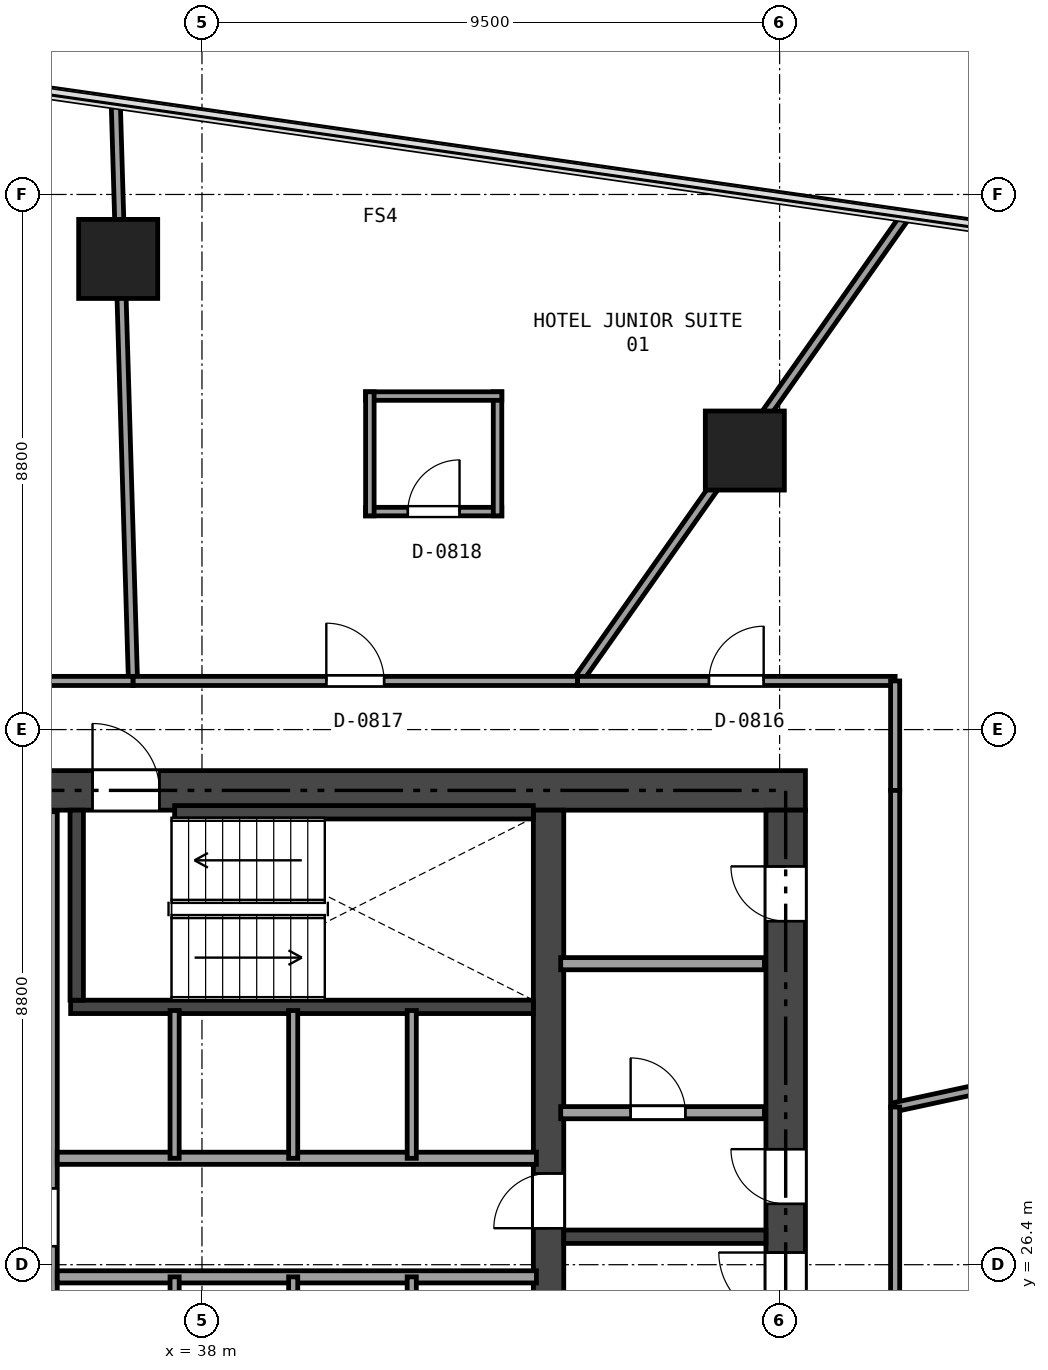
"""IFC4 building model, lengths in metres.
Left out: names, types, materials, properties, quantities, classifications, styles, units other than length and angle.
Written with IfcOpenShell. Run it as: python <this file> out.ifc"""

import sys

from ifc_helpers import new_model, si_unit, direction, frame, frame_2d, origin, origin_2d, place, context, subcontext, project, spatial, rectangle, extrude, element, fill, save


model = new_model("IFC4")
c1 = context("Model", 3, precision=1e-05, world=origin(), true_north=direction((0.0, 1.0)))
c2 = subcontext(c1, "Body", "Model", "MODEL_VIEW")
j1 = project(units=[si_unit("LENGTHUNIT", "METRE"), si_unit("PLANEANGLEUNIT", "RADIAN")], contexts=[c1])
p1 = place(None, origin())
s1 = spatial("IfcSite", under=j1, at=p1, CompositionType="ELEMENT")
p2 = place(p1, origin())
s2 = spatial("IfcBuilding", under=s1, at=p2, CompositionType="ELEMENT")
p3 = place(p2, frame((0.0, 0.0, 37.35)))
s3 = spatial("IfcBuildingStorey", under=s2, at=p3, CompositionType="ELEMENT", Elevation=37.35)
p4 = place(p3, frame((26.475, 34.2, 0.0), z_axis=(0.0, 0.0, 1.0), x_axis=(1.0, 0.0, 0.0)))
e1 = element("IfcWall", 1, at=p4, inside=s3, PredefinedType="SHEAR", context=c2, shape_type="SweptSolid", body=[
    extrude(rectangle(XDim=21.45, YDim=0.65, at=frame_2d((10.725, 0.0))), origin(), (0.0, 0.0, 1.0), 3.17),
])
p5 = place(p4, frame((9.725, 0.0, 0.0)))
e2 = element("IfcOpeningElement", 2, at=p5, cuts=e1, PredefinedType="OPENING", context=c2, shape_type="SweptSolid", body=[
    extrude(rectangle(XDim=1.1, YDim=2.15, at=frame_2d((0.55, 1.075))), frame((0.0, 0.335, 0.0), z_axis=(0.0, -1.0, 0.0), x_axis=(1.0, 0.0, 0.0)), (0.0, 0.0, 1.0), 0.67),
])
p6 = place(p4, frame((1.975, 0.0, 0.0)))
e3 = element("IfcOpeningElement", 3, at=p6, cuts=e1, PredefinedType="OPENING", context=c2, shape_type="SweptSolid", body=[
    extrude(rectangle(XDim=0.9, YDim=2.1, at=frame_2d((0.45, 1.05))), frame((0.0, 0.335, 0.0), z_axis=(0.0, -1.0, 0.0), x_axis=(1.0, 0.0, 0.0)), (0.0, 0.0, 1.0), 0.67),
])
p7 = place(p4, frame((6.275, 0.0, 0.0)))
e4 = element("IfcOpeningElement", 4, at=p7, cuts=e1, PredefinedType="OPENING", context=c2, shape_type="SweptSolid", body=[
    extrude(rectangle(XDim=0.9, YDim=2.1, at=frame_2d((0.45, 1.05))), frame((0.0, 0.335, 0.0), z_axis=(0.0, -1.0, 0.0), x_axis=(1.0, 0.0, 0.0)), (0.0, 0.0, 1.0), 0.67),
])
p8 = place(p3, frame((47.6, 18.925, 0.0), z_axis=(0.0, 0.0, 1.0), x_axis=(0.0, 1.0, 0.0)))
e5 = element("IfcWall", 5, at=p8, inside=s3, PredefinedType="SHEAR", context=c2, shape_type="SweptSolid", body=[
    extrude(rectangle(XDim=14.95, YDim=0.65, at=frame_2d((7.475, 0.0))), origin(), (0.0, 0.0, 1.0), 3.17),
])
p9 = place(p8, frame((6.575, 0.0, 0.0)))
e6 = element("IfcOpeningElement", 6, at=p9, cuts=e5, PredefinedType="OPENING", context=c2, shape_type="SweptSolid", body=[
    extrude(rectangle(XDim=1.1, YDim=2.15, at=frame_2d((0.55, 1.075))), frame((0.0, 0.335, 0.0), z_axis=(0.0, -1.0, 0.0), x_axis=(1.0, 0.0, 0.0)), (0.0, 0.0, 1.0), 0.67),
])
p10 = place(p8, frame((8.475, 0.0, 0.0)))
e7 = element("IfcOpeningElement", 7, at=p10, cuts=e5, PredefinedType="OPENING", context=c2, shape_type="SweptSolid", body=[
    extrude(rectangle(XDim=0.9, YDim=2.1, at=frame_2d((0.45, 1.05))), frame((0.0, 0.335, 0.0), z_axis=(0.0, -1.0, 0.0), x_axis=(1.0, 0.0, 0.0)), (0.0, 0.0, 1.0), 0.67),
])
p11 = place(p8, frame((13.125, 0.0, 0.0)))
e8 = element("IfcOpeningElement", 8, at=p11, cuts=e5, PredefinedType="OPENING", context=c2, shape_type="SweptSolid", body=[
    extrude(rectangle(XDim=0.9, YDim=2.1, at=frame_2d((0.45, 1.05))), frame((0.0, 0.335, 0.0), z_axis=(0.0, -1.0, 0.0), x_axis=(1.0, 0.0, 0.0)), (0.0, 0.0, 1.0), 0.67),
])
p12 = place(p3, frame((43.7, 18.925, 0.0), z_axis=(0.0, 0.0, 1.0), x_axis=(0.0, 1.0, 0.0)))
e9 = element("IfcWall", 9, at=p12, inside=s3, PredefinedType="SHEAR", context=c2, shape_type="SweptSolid", body=[
    extrude(rectangle(XDim=14.95, YDim=0.5, at=frame_2d((7.475, 0.0))), origin(), (0.0, 0.0, 1.0), 3.17),
])
p13 = place(p12, frame((8.075, 0.0, 0.0)))
e10 = element("IfcOpeningElement", 10, at=p13, cuts=e9, PredefinedType="OPENING", context=c2, shape_type="SweptSolid", body=[
    extrude(rectangle(XDim=0.9, YDim=2.1, at=frame_2d((0.45, 1.05))), frame((0.0, 0.26, 0.0), z_axis=(0.0, -1.0, 0.0), x_axis=(1.0, 0.0, 0.0)), (0.0, 0.0, 1.0), 0.52),
])
p14 = place(p3, frame((43.95, 26.86, 0.0), z_axis=(0.0, 0.0, 1.0), x_axis=(1.0, 0.0, 0.0)))
e11 = element("IfcWall", 11, at=p14, inside=s3, PredefinedType="SHEAR", context=c2, shape_type="SweptSolid", body=[
    extrude(rectangle(XDim=3.325, YDim=0.22, at=frame_2d((1.663, 0.0))), origin(), (0.0, 0.0, 1.0), 3.17),
])
p15 = place(p3, frame((35.84, 30.64, 0.0), z_axis=(0.0, 0.0, 1.0), x_axis=(1.0, 0.0, 0.0)))
e12 = element("IfcWall", 12, at=p15, inside=s3, PredefinedType="SHEAR", context=c2, shape_type="SweptSolid", body=[
    extrude(rectangle(XDim=7.61, YDim=0.22, at=frame_2d((3.805, 0.0))), origin(), (0.0, 0.0, 1.0), 3.17),
])
p16 = place(p3, frame((35.94, 30.75, 0.0), z_axis=(0.0, 0.0, 1.0), x_axis=(0.0, 1.0, 0.0)))
e13 = element("IfcWall", 13, at=p16, inside=s3, PredefinedType="SHEAR", context=c2, shape_type="SweptSolid", body=[
    extrude(rectangle(XDim=3.125, YDim=0.22, at=frame_2d((1.562, 0.0))), origin(), (0.0, 0.0, 1.0), 3.17),
])
p17 = place(p3, frame((37.55, 33.84, 0.0), z_axis=(0.0, 0.0, 1.0), x_axis=(1.0, 0.0, 0.0)))
e14 = element("IfcWall", 14, at=p17, inside=s3, PredefinedType="SHEAR", context=c2, shape_type="SweptSolid", body=[
    extrude(rectangle(XDim=5.9, YDim=0.22, at=frame_2d((2.95, 0.0))), origin(), (0.0, 0.0, 1.0), 3.17),
])
for number, where, z_axis, x_axis in (
    (15, (46.928, 39.789, 0.0), (0.0, 0.0, 1.0), (1.0, 0.0, 0.0)),
    (16, (36.622, 42.94, 0.0), (0.0, 0.0, 1.0), (1.0, 0.0, 0.0)),
):
    element("IfcColumn", number, at=place(p3, frame(where, z_axis=z_axis, x_axis=x_axis)), inside=s3, PredefinedType="COLUMN", context=c2, shape_type="SweptSolid", body=[
        extrude(rectangle(XDim=1.3, YDim=1.3, at=origin_2d()), origin(), (0.0, 0.0, 1.0), 3.17),
    ])
p18 = place(p3, frame((43.9, 28.9, 0.0), z_axis=(0.0, 0.0, 1.0), x_axis=(1.0, 0.0, 0.0)))
e17 = element("IfcWall", 17, at=p18, inside=s3, PredefinedType="SOLIDWALL", context=c2, shape_type="SweptSolid", body=[
    extrude(rectangle(XDim=3.35, YDim=0.2, at=frame_2d((1.675, 0.0))), origin(), (0.0, 0.0, 1.0), 3.17),
])
p19 = place(p18, frame((1.15, 0.0, 0.0)))
e18 = element("IfcOpeningElement", 18, at=p19, cuts=e17, PredefinedType="OPENING", context=c2, shape_type="SweptSolid", body=[
    extrude(rectangle(XDim=0.9, YDim=2.1, at=frame_2d((0.45, 1.05))), frame((0.0, 0.11, 0.0), z_axis=(0.0, -1.0, 0.0), x_axis=(1.0, 0.0, 0.0)), (0.0, 0.0, 1.0), 0.22),
])
p20 = place(p3, frame((43.9, 31.35, 0.0), z_axis=(0.0, 0.0, 1.0), x_axis=(1.0, 0.0, 0.0)))
e19 = element("IfcWall", 19, at=p20, inside=s3, PredefinedType="SOLIDWALL", context=c2, shape_type="SweptSolid", body=[
    extrude(rectangle(XDim=3.35, YDim=0.2, at=frame_2d((1.675, 0.0))), origin(), (0.0, 0.0, 1.0), 3.17),
])
p21 = place(p3, frame((35.52, 18.95, 0.0), z_axis=(0.0, 0.0, 1.0), x_axis=(0.0, 1.0, 0.0)))
e20 = element("IfcWall", 20, at=p21, inside=s3, PredefinedType="SOLIDWALL", context=c2, shape_type="SweptSolid", body=[
    extrude(rectangle(XDim=14.9, YDim=0.2, at=frame_2d((7.45, 0.0))), origin(), (0.0, 0.0, 1.0), 2.691),
])
p22 = place(p21, frame((7.755, 0.0, 0.0)))
e21 = element("IfcOpeningElement", 21, at=p22, cuts=e20, PredefinedType="OPENING", context=c2, shape_type="SweptSolid", body=[
    extrude(rectangle(XDim=0.95, YDim=2.15, at=frame_2d((0.475, 1.075))), frame((0.0, 0.11, 0.0), z_axis=(0.0, -1.0, 0.0), x_axis=(1.0, 0.0, 0.0)), (0.0, 0.0, 1.0), 0.22),
])
p23 = place(p21, frame((0.6, 0.0, 0.0)))
e22 = element("IfcOpeningElement", 22, at=p23, cuts=e20, PredefinedType="OPENING", context=c2, shape_type="SweptSolid", body=[
    extrude(rectangle(XDim=0.9, YDim=2.1, at=frame_2d((0.45, 1.05))), frame((0.0, 0.11, 0.0), z_axis=(0.0, -1.0, 0.0), x_axis=(1.0, 0.0, 0.0)), (0.0, 0.0, 1.0), 0.22),
])
for number, where, z_axis, x_axis in (
    (23, (35.62, 28.15, 0.0), (0.0, 0.0, 1.0), (1.0, 0.0, 0.0)),
    (24, (35.62, 26.2, 0.0), (0.0, 0.0, 1.0), (1.0, 0.0, 0.0)),
):
    element("IfcWall", number, at=place(p3, frame(where, z_axis=z_axis, x_axis=x_axis)), inside=s3, PredefinedType="SOLIDWALL", context=c2, shape_type="SweptSolid", body=[
        extrude(rectangle(XDim=7.88, YDim=0.2, at=frame_2d((3.94, 0.0))), origin(), (0.0, 0.0, 1.0), 3.17),
    ])
for number, where, z_axis, x_axis in (
    (25, (37.55, 28.15, 0.0), (0.0, 0.0, 1.0), (0.0, 1.0, 0.0)),
    (26, (39.5, 28.15, 0.0), (0.0, 0.0, 1.0), (0.0, 1.0, 0.0)),
    (27, (41.45, 28.15, 0.0), (0.0, 0.0, 1.0), (0.0, 1.0, 0.0)),
):
    element("IfcWall", number, at=place(p3, frame(where, z_axis=z_axis, x_axis=x_axis)), inside=s3, PredefinedType="PARTITIONING", context=c2, shape_type="SweptSolid", body=[
        extrude(rectangle(XDim=2.43, YDim=0.15, at=frame_2d((1.215, 0.0))), origin(), (0.0, 0.0, 1.0), 3.17),
    ])
for number, where, z_axis, x_axis in (
    (28, (37.55, 23.65, 0.0), (0.0, 0.0, 1.0), (0.0, 1.0, 0.0)),
    (29, (39.5, 23.65, 0.0), (0.0, 0.0, 1.0), (0.0, 1.0, 0.0)),
    (30, (41.45, 23.65, 0.0), (0.0, 0.0, 1.0), (0.0, 1.0, 0.0)),
):
    element("IfcWall", number, at=place(p3, frame(where, z_axis=z_axis, x_axis=x_axis)), inside=s3, PredefinedType="PARTITIONING", context=c2, shape_type="SweptSolid", body=[
        extrude(rectangle(XDim=2.55, YDim=0.15, at=frame_2d((1.275, 0.0))), origin(), (0.0, 0.0, 1.0), 2.691),
    ])
p24 = place(p3, frame((40.691, 38.785, 0.0), z_axis=(0.0, 0.0, 1.0), x_axis=(1.0, 0.0, 0.0)))
e31 = element("IfcWall", 31, at=p24, inside=s3, PredefinedType="PARTITIONING", context=c2, shape_type="SweptSolid", body=[
    extrude(rectangle(XDim=2.24, YDim=0.14, at=frame_2d((1.12, 0.0))), origin(), (0.0, 0.0, 1.0), 3.17),
])
p25 = place(p24, frame((0.695, 0.0, 0.0)))
e32 = element("IfcOpeningElement", 32, at=p25, cuts=e31, PredefinedType="OPENING", context=c2, shape_type="SweptSolid", body=[
    extrude(rectangle(XDim=0.85, YDim=2.1, at=frame_2d((0.425, 1.05))), frame((0.0, 0.08, 0.0), z_axis=(0.0, -1.0, 0.0), x_axis=(1.0, 0.0, 0.0)), (0.0, 0.0, 1.0), 0.16),
])
p26 = place(p3, frame((42.861, 38.715, 0.0), z_axis=(0.0, 0.0, 1.0), x_axis=(0.0, 1.0, 0.0)))
e33 = element("IfcWall", 33, at=p26, inside=s3, PredefinedType="PARTITIONING", context=c2, shape_type="SweptSolid", body=[
    extrude(rectangle(XDim=2.04, YDim=0.14, at=frame_2d((1.02, 0.0))), origin(), (0.0, 0.0, 1.0), 2.747),
])
p27 = place(p3, frame((42.931, 40.685, 0.0), z_axis=(0.0, 0.0, 1.0), x_axis=(-1.0, 0.0, 0.0)))
e34 = element("IfcWall", 34, at=p27, inside=s3, PredefinedType="PARTITIONING", context=c2, shape_type="SweptSolid", body=[
    extrude(rectangle(XDim=2.24, YDim=0.14, at=frame_2d((1.12, 0.0))), origin(), (0.0, 0.0, 1.0), 3.17),
])
p28 = place(p3, frame((40.761, 40.755, 0.0), z_axis=(0.0, 0.0, 1.0), x_axis=(0.0, -1.0, 0.0)))
e35 = element("IfcWall", 35, at=p28, inside=s3, PredefinedType="PARTITIONING", context=c2, shape_type="SweptSolid", body=[
    extrude(rectangle(XDim=2.04, YDim=0.14, at=frame_2d((1.02, 0.0))), origin(), (0.0, 0.0, 1.0), 2.747),
])
p29 = place(p3, frame((49.594, 43.681, 0.0), z_axis=(0.0, 0.0, 1.0), x_axis=(-0.576479240775, -0.817111794649, 0.0)))
e36 = element("IfcWall", 36, at=p29, inside=s3, PredefinedType="PARTITIONING", context=c2, shape_type="SweptSolid", body=[
    extrude(rectangle(XDim=9.4, YDim=0.15, at=frame_2d((4.7, 0.0))), origin(), (0.0, 0.0, 1.0), 2.395),
])
p30 = place(p3, frame((44.175, 36.0, 0.0), z_axis=(0.0, 0.0, 1.0), x_axis=(1.0, 0.0, 0.0)))
e37 = element("IfcWall", 37, at=p30, inside=s3, PredefinedType="PARTITIONING", context=c2, shape_type="SweptSolid", body=[
    extrude(rectangle(XDim=5.225, YDim=0.15, at=frame_2d((2.612, 0.0))), origin(), (0.0, 0.0, 1.0), 2.355),
])
p31 = place(p30, frame((2.163, 0.0, 0.0)))
e38 = element("IfcOpeningElement", 38, at=p31, cuts=e37, PredefinedType="OPENING", context=c2, shape_type="SweptSolid", body=[
    extrude(rectangle(XDim=0.9, YDim=2.0, at=frame_2d((0.45, 1.0))), frame((0.0, 0.085, 0.0), z_axis=(0.0, -1.0, 0.0), x_axis=(1.0, 0.0, 0.0)), (0.0, 0.0, 1.0), 0.17),
])
p32 = place(p3, frame((49.4, 36.0, 0.0), z_axis=(0.0, 0.0, 1.0), x_axis=(0.0, -1.0, 0.0)))
e39 = element("IfcWall", 39, at=p32, inside=s3, PredefinedType="PARTITIONING", context=c2, shape_type="SweptSolid", body=[
    extrude(rectangle(XDim=1.8, YDim=0.15, at=frame_2d((0.9, 0.0))), origin(), (0.0, 0.0, 1.0), 2.355),
])
p33 = place(p3, frame((49.4, 34.2, 0.0), z_axis=(0.0, 0.0, 1.0), x_axis=(0.0, -1.0, 0.0)))
e40 = element("IfcWall", 40, at=p33, inside=s3, PredefinedType="PARTITIONING", context=c2, shape_type="SweptSolid", body=[
    extrude(rectangle(XDim=5.207, YDim=0.15, at=frame_2d((2.604, 0.0))), origin(), (0.0, 0.0, 1.0), 2.395),
])
p34 = place(p3, frame((49.4, 28.993, 0.0), z_axis=(0.0, 0.0, 1.0), x_axis=(0.977465823559, 0.211093732201, 0.0)))
e41 = element("IfcWall", 41, at=p34, inside=s3, PredefinedType="PARTITIONING", context=c2, shape_type="SweptSolid", body=[
    extrude(rectangle(XDim=14.767, YDim=0.15, at=frame_2d((7.383, 0.0))), origin(), (0.0, 0.0, 1.0), 2.395),
])
p35 = place(p3, frame((36.581, 45.539, 0.0), z_axis=(0.0, 0.0, 1.0), x_axis=(0.029752383797, -0.999557299837, 0.0)))
e42 = element("IfcWall", 42, at=p35, inside=s3, PredefinedType="PARTITIONING", context=c2, shape_type="SweptSolid", body=[
    extrude(rectangle(XDim=9.543, YDim=0.15, at=frame_2d((4.771, 0.0))), origin(), (0.0, 0.0, 1.0), 2.395),
])
p36 = place(p3, frame((36.865, 36.0, 0.0), z_axis=(0.0, 0.0, 1.0), x_axis=(1.0, 0.0, 0.0)))
e43 = element("IfcWall", 43, at=p36, inside=s3, PredefinedType="PARTITIONING", context=c2, shape_type="SweptSolid", body=[
    extrude(rectangle(XDim=7.31, YDim=0.15, at=frame_2d((3.655, 0.0))), origin(), (0.0, 0.0, 1.0), 2.395),
])
p37 = place(p36, frame((3.18, 0.0, 0.0)))
e44 = element("IfcOpeningElement", 44, at=p37, cuts=e43, PredefinedType="OPENING", context=c2, shape_type="SweptSolid", body=[
    extrude(rectangle(XDim=0.95, YDim=2.15, at=frame_2d((0.475, 1.075))), frame((0.0, 0.085, 0.0), z_axis=(0.0, -1.0, 0.0), x_axis=(1.0, 0.0, 0.0)), (0.0, 0.0, 1.0), 0.17),
])
p38 = place(p3, frame((29.7, 36.0, 0.0), z_axis=(0.0, 0.0, 1.0), x_axis=(1.0, 0.0, 0.0)))
e45 = element("IfcWall", 45, at=p38, inside=s3, PredefinedType="PARTITIONING", context=c2, shape_type="SweptSolid", body=[
    extrude(rectangle(XDim=7.165, YDim=0.15, at=frame_2d((3.583, 0.0))), origin(), (0.0, 0.0, 1.0), 2.395),
])
p39 = place(p38, frame((3.108, 0.0, 0.0)))
e46 = element("IfcOpeningElement", 46, at=p39, cuts=e45, PredefinedType="OPENING", context=c2, shape_type="SweptSolid", body=[
    extrude(rectangle(XDim=0.95, YDim=2.15, at=frame_2d((0.475, 1.075))), frame((0.0, 0.085, 0.0), z_axis=(0.0, -1.0, 0.0), x_axis=(1.0, 0.0, 0.0)), (0.0, 0.0, 1.0), 0.17),
])
p40 = place(p3, frame((49.4, 28.993, 0.0), z_axis=(0.0, 0.0, 1.0), x_axis=(0.0, -1.0, 0.0)))
e47 = element("IfcWall", 47, at=p40, inside=s3, PredefinedType="PARTITIONING", context=c2, shape_type="SweptSolid", body=[
    extrude(rectangle(XDim=7.033, YDim=0.15, at=frame_2d((3.517, 0.0))), origin(), (0.0, 0.0, 1.0), 2.395),
])
p41 = place(p40, frame((3.041, 0.0, 0.0)))
e48 = element("IfcOpeningElement", 48, at=p41, cuts=e47, PredefinedType="OPENING", context=c2, shape_type="SweptSolid", body=[
    extrude(rectangle(XDim=0.95, YDim=2.15, at=frame_2d((0.475, 1.075))), frame((0.0, 0.085, 0.0), z_axis=(0.0, -1.0, 0.0), x_axis=(1.0, 0.0, 0.0)), (0.0, 0.0, 1.0), 0.17),
])
p42 = place(p9, origin())
e49 = element("IfcDoor", 49, at=p42, inside=s3, OperationType="SINGLE_SWING_RIGHT", PredefinedType="DOOR", context=c2, shape_type="SweptSolid", body=[
    extrude(rectangle(XDim=1.1, YDim=2.15, at=frame_2d((0.55, 1.075))), frame((0.0, 0.025, 0.0), z_axis=(0.0, -1.0, 0.0), x_axis=(1.0, 0.0, 0.0)), (0.0, 0.0, 1.0), 0.05),
])
fill(e6, e49)
p43 = place(p5, origin())
e50 = element("IfcDoor", 50, at=p43, inside=s3, OperationType="SINGLE_SWING_LEFT", PredefinedType="DOOR", context=c2, shape_type="SweptSolid", body=[
    extrude(rectangle(XDim=1.1, YDim=2.15, at=frame_2d((0.55, 1.075))), frame((0.0, 0.025, 0.0), z_axis=(0.0, -1.0, 0.0), x_axis=(1.0, 0.0, 0.0)), (0.0, 0.0, 1.0), 0.05),
])
fill(e2, e50)
p44 = place(p22, origin())
e51 = element("IfcDoor", 51, at=p44, inside=s3, OperationType="SINGLE_SWING_RIGHT", PredefinedType="DOOR", context=c2, shape_type="SweptSolid", body=[
    extrude(rectangle(XDim=0.95, YDim=2.15, at=frame_2d((0.475, 1.075))), frame((0.0, 0.025, 0.0), z_axis=(0.0, -1.0, 0.0), x_axis=(1.0, 0.0, 0.0)), (0.0, 0.0, 1.0), 0.05),
])
fill(e21, e51)
p45 = place(p13, origin())
e52 = element("IfcDoor", 52, at=p45, inside=s3, OperationType="SINGLE_SWING_LEFT", PredefinedType="DOOR", context=c2, shape_type="SweptSolid", body=[
    extrude(rectangle(XDim=0.9, YDim=2.1, at=frame_2d((0.45, 1.05))), frame((0.0, 0.025, 0.0), z_axis=(0.0, -1.0, 0.0), x_axis=(1.0, 0.0, 0.0)), (0.0, 0.0, 1.0), 0.05),
])
fill(e10, e52)
p46 = place(p10, origin())
e53 = element("IfcDoor", 53, at=p46, inside=s3, OperationType="SINGLE_SWING_RIGHT", PredefinedType="DOOR", context=c2, shape_type="SweptSolid", body=[
    extrude(rectangle(XDim=0.9, YDim=2.1, at=frame_2d((0.45, 1.05))), frame((0.0, 0.025, 0.0), z_axis=(0.0, -1.0, 0.0), x_axis=(1.0, 0.0, 0.0)), (0.0, 0.0, 1.0), 0.05),
])
fill(e7, e53)
p47 = place(p19, origin())
e54 = element("IfcDoor", 54, at=p47, inside=s3, OperationType="SINGLE_SWING_LEFT", PredefinedType="DOOR", context=c2, shape_type="SweptSolid", body=[
    extrude(rectangle(XDim=0.9, YDim=2.1, at=frame_2d((0.45, 1.05))), frame((0.0, 0.025, 0.0), z_axis=(0.0, -1.0, 0.0), x_axis=(1.0, 0.0, 0.0)), (0.0, 0.0, 1.0), 0.05),
])
fill(e18, e54)
p48 = place(p11, origin())
e55 = element("IfcDoor", 55, at=p48, inside=s3, OperationType="SINGLE_SWING_RIGHT", PredefinedType="DOOR", context=c2, shape_type="SweptSolid", body=[
    extrude(rectangle(XDim=0.9, YDim=2.1, at=frame_2d((0.45, 1.05))), frame((0.0, 0.025, 0.0), z_axis=(0.0, -1.0, 0.0), x_axis=(1.0, 0.0, 0.0)), (0.0, 0.0, 1.0), 0.05),
])
fill(e8, e55)
p49 = place(p31, origin())
e56 = element("IfcDoor", 56, at=p49, inside=s3, OperationType="SINGLE_SWING_RIGHT", PredefinedType="DOOR", context=c2, shape_type="SweptSolid", body=[
    extrude(rectangle(XDim=0.9, YDim=2.0, at=frame_2d((0.45, 1.0))), frame((0.0, 0.025, 0.0), z_axis=(0.0, -1.0, 0.0), x_axis=(1.0, 0.0, 0.0)), (0.0, 0.0, 1.0), 0.05),
])
fill(e38, e56)
p50 = place(p37, origin())
e57 = element("IfcDoor", 57, at=p50, inside=s3, OperationType="SINGLE_SWING_LEFT", PredefinedType="DOOR", context=c2, shape_type="SweptSolid", body=[
    extrude(rectangle(XDim=0.95, YDim=2.15, at=frame_2d((0.475, 1.075))), frame((0.0, 0.025, 0.0), z_axis=(0.0, -1.0, 0.0), x_axis=(1.0, 0.0, 0.0)), (0.0, 0.0, 1.0), 0.05),
])
fill(e44, e57)
p51 = place(p25, origin())
e58 = element("IfcDoor", 58, at=p51, inside=s3, OperationType="SINGLE_SWING_RIGHT", PredefinedType="DOOR", context=c2, shape_type="SweptSolid", body=[
    extrude(rectangle(XDim=0.85, YDim=2.1, at=frame_2d((0.425, 1.05))), frame((0.0, 0.025, 0.0), z_axis=(0.0, -1.0, 0.0), x_axis=(1.0, 0.0, 0.0)), (0.0, 0.0, 1.0), 0.05),
])
fill(e32, e58)
save(model, sys.argv[1])
